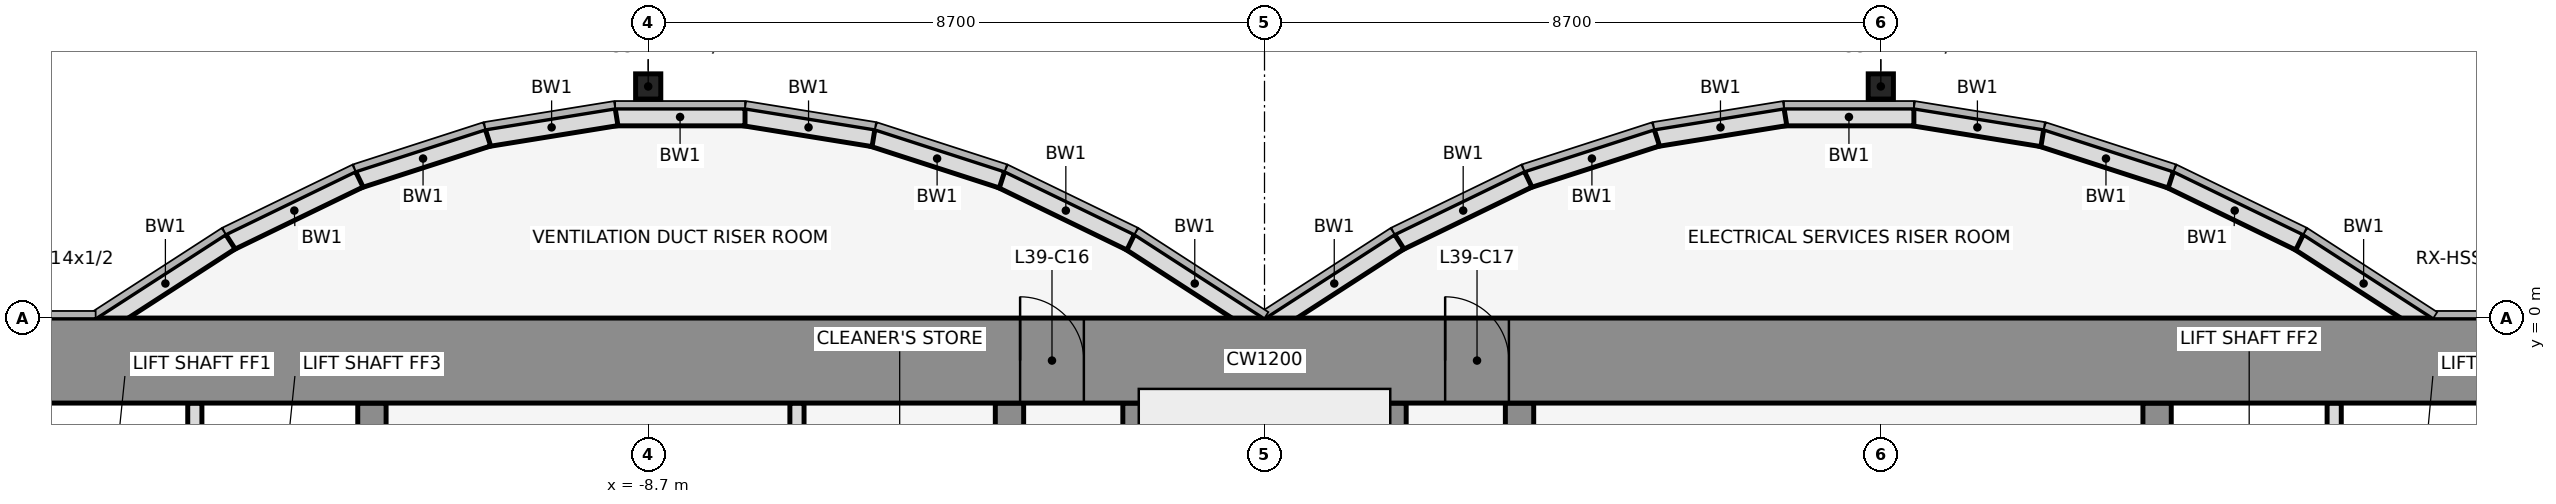
"""IFC4 building model, lengths in metres.
Left out: names, types, materials, properties, quantities, classifications, styles, units other than length and angle.
Written with IfcOpenShell. Run it as: python <this file> out.ifc"""

import sys

from ifc_helpers import new_model, si_unit, direction, frame, frame_2d, origin, origin_2d, place, context, subcontext, project, spatial, rectangle, hollow_rectangle, extrude, element, fill, save


model = new_model("IFC4")
c1 = context("Model", 3, precision=1e-05, world=origin(), true_north=direction((0.0, 1.0)))
c2 = subcontext(c1, "Body", "Model", "MODEL_VIEW")
j1 = project(units=[si_unit("LENGTHUNIT", "METRE"), si_unit("PLANEANGLEUNIT", "RADIAN")], contexts=[c1])
p1 = place(None, origin())
s1 = spatial("IfcSite", under=j1, at=p1, CompositionType="ELEMENT")
p2 = place(p1, origin())
s2 = spatial("IfcBuilding", under=s1, at=p2, CompositionType="ELEMENT")
p3 = place(p2, frame((0.0, 0.0, 177.3)))
s3 = spatial("IfcBuildingStorey", under=s2, at=p3, CompositionType="ELEMENT", Elevation=177.3)
for number, where, z_axis, x_axis in (
    (1, (-8.7, 3.269, 0.0), (0.0, 0.0, 1.0), (1.0, 0.0, 0.0)),
    (2, (8.7, 3.269, 0.0), (0.0, 0.0, 1.0), (1.0, 0.0, 0.0)),
):
    element("IfcColumn", number, at=place(p3, frame(where, z_axis=z_axis, x_axis=x_axis)), inside=s3, PredefinedType="COLUMN", context=c2, shape_type="SweptSolid", body=[
        extrude(hollow_rectangle(XDim=0.356, YDim=0.356, WallThickness=0.012, at=origin_2d()), origin(), (0.0, 0.0, 1.0), 4.1),
    ])
p4 = place(p3, frame((16.432, -0.105, 0.0), z_axis=(0.0, 0.0, 1.0), x_axis=(-0.83981312244, 0.542875602121, 0.0)))
e3 = element("IfcWall", 3, at=p4, inside=s3, PredefinedType="STANDARD", context=c2, shape_type="SweptSolid", body=[
    extrude(rectangle(XDim=2.183, YDim=0.25, at=frame_2d((1.091, 0.0))), origin(), (0.0, 0.0, 1.0), 3.95),
])
p5 = place(p3, frame((14.612, 1.073, 0.0), z_axis=(0.0, 0.0, 1.0), x_axis=(-0.89982408427, 0.436252928206, 0.0)))
e4 = element("IfcWall", 4, at=p5, inside=s3, PredefinedType="STANDARD", context=c2, shape_type="SweptSolid", body=[
    extrude(rectangle(XDim=2.038, YDim=0.25, at=frame_2d((1.019, 0.0))), origin(), (0.0, 0.0, 1.0), 3.95),
])
p6 = place(p3, frame((12.795, 1.955, 0.0), z_axis=(0.0, 0.0, 1.0), x_axis=(-0.951495806175, 0.307661714928, 0.0)))
e5 = element("IfcWall", 5, at=p6, inside=s3, PredefinedType="STANDARD", context=c2, shape_type="SweptSolid", body=[
    extrude(rectangle(XDim=1.927, YDim=0.25, at=frame_2d((0.963, 0.0))), origin(), (0.0, 0.0, 1.0), 3.95),
])
p7 = place(p3, frame((10.98, 2.543, 0.0), z_axis=(0.0, 0.0, 1.0), x_axis=(-0.987181718931, 0.159600293885, 0.0)))
e6 = element("IfcWall", 6, at=p7, inside=s3, PredefinedType="STANDARD", context=c2, shape_type="SweptSolid", body=[
    extrude(rectangle(XDim=1.857, YDim=0.25, at=frame_2d((0.929, 0.0))), origin(), (0.0, 0.0, 1.0), 3.95),
])
p8 = place(p3, frame((9.167, 2.838, 0.0), z_axis=(0.0, 0.0, 1.0), x_axis=(-1.0, 0.0, 0.0)))
e7 = element("IfcWall", 7, at=p8, inside=s3, PredefinedType="STANDARD", context=c2, shape_type="SweptSolid", body=[
    extrude(rectangle(XDim=1.833, YDim=0.25, at=frame_2d((0.917, 0.0))), origin(), (0.0, 0.0, 1.0), 3.95),
])
p9 = place(p3, frame((7.353, 2.84, 0.0), z_axis=(0.0, 0.0, 1.0), x_axis=(-0.987181718931, -0.159600293885, 0.0)))
e8 = element("IfcWall", 8, at=p9, inside=s3, PredefinedType="STANDARD", context=c2, shape_type="SweptSolid", body=[
    extrude(rectangle(XDim=1.857, YDim=0.25, at=frame_2d((0.929, 0.0))), origin(), (0.0, 0.0, 1.0), 3.95),
])
p10 = place(p3, frame((5.538, 2.548, 0.0), z_axis=(0.0, 0.0, 1.0), x_axis=(-0.951495806175, -0.307661714928, 0.0)))
e9 = element("IfcWall", 9, at=p10, inside=s3, PredefinedType="STANDARD", context=c2, shape_type="SweptSolid", body=[
    extrude(rectangle(XDim=1.927, YDim=0.25, at=frame_2d((0.963, 0.0))), origin(), (0.0, 0.0, 1.0), 3.95),
])
p11 = place(p3, frame((3.721, 1.962, 0.0), z_axis=(0.0, 0.0, 1.0), x_axis=(-0.89982408427, -0.436252928206, 0.0)))
e10 = element("IfcWall", 10, at=p11, inside=s3, PredefinedType="STANDARD", context=c2, shape_type="SweptSolid", body=[
    extrude(rectangle(XDim=2.038, YDim=0.25, at=frame_2d((1.019, 0.0))), origin(), (0.0, 0.0, 1.0), 3.95),
])
for number, where, z_axis, x_axis in (
    (11, (1.901, 1.08, 0.0), (0.0, 0.0, 1.0), (-0.84, -0.543, 0.0)),
    (12, (-0.068, -0.105, 0.0), (0.0, 0.0, 1.0), (-0.84, 0.543, 0.0)),
):
    element("IfcWall", number, at=place(p3, frame(where, z_axis=z_axis, x_axis=x_axis)), inside=s3, PredefinedType="STANDARD", context=c2, shape_type="SweptSolid", body=[
        extrude(rectangle(XDim=2.183, YDim=0.25, at=frame_2d((1.091, 0.0))), origin(), (0.0, 0.0, 1.0), 3.95),
    ])
p12 = place(p3, frame((-1.888, 1.073, 0.0), z_axis=(0.0, 0.0, 1.0), x_axis=(-0.89982408427, 0.436252928206, 0.0)))
e13 = element("IfcWall", 13, at=p12, inside=s3, PredefinedType="STANDARD", context=c2, shape_type="SweptSolid", body=[
    extrude(rectangle(XDim=2.038, YDim=0.25, at=frame_2d((1.019, 0.0))), origin(), (0.0, 0.0, 1.0), 3.95),
])
p13 = place(p3, frame((-3.705, 1.955, 0.0), z_axis=(0.0, 0.0, 1.0), x_axis=(-0.951495806175, 0.307661714928, 0.0)))
e14 = element("IfcWall", 14, at=p13, inside=s3, PredefinedType="STANDARD", context=c2, shape_type="SweptSolid", body=[
    extrude(rectangle(XDim=1.927, YDim=0.25, at=frame_2d((0.963, 0.0))), origin(), (0.0, 0.0, 1.0), 3.95),
])
p14 = place(p3, frame((-5.52, 2.543, 0.0), z_axis=(0.0, 0.0, 1.0), x_axis=(-0.987181718931, 0.159600293885, 0.0)))
e15 = element("IfcWall", 15, at=p14, inside=s3, PredefinedType="STANDARD", context=c2, shape_type="SweptSolid", body=[
    extrude(rectangle(XDim=1.857, YDim=0.25, at=frame_2d((0.929, 0.0))), origin(), (0.0, 0.0, 1.0), 3.95),
])
p15 = place(p3, frame((-7.333, 2.838, 0.0), z_axis=(0.0, 0.0, 1.0), x_axis=(-1.0, 0.0, 0.0)))
e16 = element("IfcWall", 16, at=p15, inside=s3, PredefinedType="STANDARD", context=c2, shape_type="SweptSolid", body=[
    extrude(rectangle(XDim=1.833, YDim=0.25, at=frame_2d((0.917, 0.0))), origin(), (0.0, 0.0, 1.0), 3.95),
])
p16 = place(p3, frame((-9.147, 2.84, 0.0), z_axis=(0.0, 0.0, 1.0), x_axis=(-0.987181718931, -0.159600293885, 0.0)))
e17 = element("IfcWall", 17, at=p16, inside=s3, PredefinedType="STANDARD", context=c2, shape_type="SweptSolid", body=[
    extrude(rectangle(XDim=1.857, YDim=0.25, at=frame_2d((0.929, 0.0))), origin(), (0.0, 0.0, 1.0), 3.95),
])
p17 = place(p3, frame((-10.962, 2.548, 0.0), z_axis=(0.0, 0.0, 1.0), x_axis=(-0.951495806175, -0.307661714928, 0.0)))
e18 = element("IfcWall", 18, at=p17, inside=s3, PredefinedType="STANDARD", context=c2, shape_type="SweptSolid", body=[
    extrude(rectangle(XDim=1.927, YDim=0.25, at=frame_2d((0.963, 0.0))), origin(), (0.0, 0.0, 1.0), 3.95),
])
p18 = place(p3, frame((-12.779, 1.962, 0.0), z_axis=(0.0, 0.0, 1.0), x_axis=(-0.89982408427, -0.436252928206, 0.0)))
e19 = element("IfcWall", 19, at=p18, inside=s3, PredefinedType="STANDARD", context=c2, shape_type="SweptSolid", body=[
    extrude(rectangle(XDim=2.038, YDim=0.25, at=frame_2d((1.019, 0.0))), origin(), (0.0, 0.0, 1.0), 3.95),
])
p19 = place(p3, frame((-14.599, 1.08, 0.0), z_axis=(0.0, 0.0, 1.0), x_axis=(-0.83981312244, -0.542875602121, 0.0)))
e20 = element("IfcWall", 20, at=p19, inside=s3, PredefinedType="STANDARD", context=c2, shape_type="SweptSolid", body=[
    extrude(rectangle(XDim=2.183, YDim=0.25, at=frame_2d((1.091, 0.0))), origin(), (0.0, 0.0, 1.0), 3.95),
])
p20 = place(p3, frame((-15.1, -4.6, 0.0), z_axis=(0.0, 0.0, 1.0), x_axis=(0.0, 1.0, 0.0)))
e21 = element("IfcWall", 21, at=p20, inside=s3, PredefinedType="PARTITIONING", context=c2, shape_type="SweptSolid", body=[
    extrude(rectangle(XDim=3.4, YDim=0.2, at=frame_2d((1.7, 0.0))), origin(), (0.0, 0.0, 1.0), 2.84),
])
p21 = place(p3, frame((-12.6, -11.8, 0.0), z_axis=(0.0, 0.0, 1.0), x_axis=(0.0, 1.0, 0.0)))
e22 = element("IfcWall", 22, at=p21, inside=s3, PredefinedType="SHEAR", context=c2, shape_type="SweptSolid", body=[
    extrude(rectangle(XDim=10.6, YDim=0.4, at=frame_2d((5.3, 0.0))), origin(), (0.0, 0.0, 1.0), 4.1),
])
p22 = place(p21, frame((4.75, 0.0, 0.0)))
e23 = element("IfcOpeningElement", 23, at=p22, cuts=e22, PredefinedType="OPENING", context=c2, shape_type="SweptSolid", body=[
    extrude(rectangle(XDim=1.1, YDim=2.1, at=frame_2d((0.55, 1.05))), frame((0.0, 0.212, 0.0), z_axis=(0.0, -1.0, 0.0), x_axis=(1.0, 0.0, 0.0)), (0.0, 0.0, 1.0), 0.424),
])
p23 = place(p3, frame((-6.6, -4.6, 0.0), z_axis=(0.0, 0.0, 1.0), x_axis=(0.0, 1.0, 0.0)))
e24 = element("IfcWall", 24, at=p23, inside=s3, PredefinedType="PARTITIONING", context=c2, shape_type="SweptSolid", body=[
    extrude(rectangle(XDim=3.4, YDim=0.2, at=frame_2d((1.7, 0.0))), origin(), (0.0, 0.0, 1.0), 2.84),
])
p24 = place(p3, frame((-3.6, -11.8, 0.0), z_axis=(0.0, 0.0, 1.0), x_axis=(0.0, 1.0, 0.0)))
e25 = element("IfcWall", 25, at=p24, inside=s3, PredefinedType="SHEAR", context=c2, shape_type="SweptSolid", body=[
    extrude(rectangle(XDim=10.6, YDim=0.4, at=frame_2d((5.3, 0.0))), origin(), (0.0, 0.0, 1.0), 4.1),
])
p25 = place(p24, frame((4.85, 0.0, 0.0)))
e26 = element("IfcOpeningElement", 26, at=p25, cuts=e25, PredefinedType="OPENING", context=c2, shape_type="SweptSolid", body=[
    extrude(rectangle(XDim=0.9, YDim=2.1, at=frame_2d((0.45, 1.05))), frame((0.0, 0.212, 0.0), z_axis=(0.0, -1.0, 0.0), x_axis=(1.0, 0.0, 0.0)), (0.0, 0.0, 1.0), 0.424),
])
for number, where, z_axis, x_axis in (
    (27, (-1.8, -11.8, 0.0), (0.0, 0.0, 1.0), (0.0, 1.0, 0.0)),
    (28, (1.8, -11.8, 0.0), (0.0, 0.0, 1.0), (0.0, 1.0, 0.0)),
):
    element("IfcWall", number, at=place(p3, frame(where, z_axis=z_axis, x_axis=x_axis)), inside=s3, PredefinedType="SHEAR", context=c2, shape_type="SweptSolid", body=[
        extrude(rectangle(XDim=10.6, YDim=0.4, at=frame_2d((5.3, 0.0))), origin(), (0.0, 0.0, 1.0), 4.1),
    ])
p26 = place(p3, frame((3.6, -11.8, 0.0), z_axis=(0.0, 0.0, 1.0), x_axis=(0.0, 1.0, 0.0)))
e29 = element("IfcWall", 29, at=p26, inside=s3, PredefinedType="SHEAR", context=c2, shape_type="SweptSolid", body=[
    extrude(rectangle(XDim=10.6, YDim=0.4, at=frame_2d((5.3, 0.0))), origin(), (0.0, 0.0, 1.0), 4.1),
])
p27 = place(p26, frame((1.35, 0.0, 0.0)))
e30 = element("IfcOpeningElement", 30, at=p27, cuts=e29, PredefinedType="OPENING", context=c2, shape_type="SweptSolid", body=[
    extrude(rectangle(XDim=0.9, YDim=2.1, at=frame_2d((0.45, 1.05))), frame((0.0, 0.212, 0.0), z_axis=(0.0, -1.0, 0.0), x_axis=(1.0, 0.0, 0.0)), (0.0, 0.0, 1.0), 0.424),
])
p28 = place(p3, frame((12.6, -11.8, 0.0), z_axis=(0.0, 0.0, 1.0), x_axis=(0.0, 1.0, 0.0)))
e31 = element("IfcWall", 31, at=p28, inside=s3, PredefinedType="SHEAR", context=c2, shape_type="SweptSolid", body=[
    extrude(rectangle(XDim=10.6, YDim=0.4, at=frame_2d((5.3, 0.0))), origin(), (0.0, 0.0, 1.0), 4.1),
])
p29 = place(p28, frame((1.25, 0.0, 0.0)))
e32 = element("IfcOpeningElement", 32, at=p29, cuts=e31, PredefinedType="OPENING", context=c2, shape_type="SweptSolid", body=[
    extrude(rectangle(XDim=1.2, YDim=2.1, at=frame_2d((0.6, 1.05))), frame((0.0, 0.212, 0.0), z_axis=(0.0, -1.0, 0.0), x_axis=(1.0, 0.0, 0.0)), (0.0, 0.0, 1.0), 0.424),
])
p30 = place(p28, frame((4.75, 0.0, 0.0)))
e33 = element("IfcOpeningElement", 33, at=p30, cuts=e31, PredefinedType="OPENING", context=c2, shape_type="SweptSolid", body=[
    extrude(rectangle(XDim=1.1, YDim=2.1, at=frame_2d((0.55, 1.05))), frame((0.0, 0.212, 0.0), z_axis=(0.0, -1.0, 0.0), x_axis=(1.0, 0.0, 0.0)), (0.0, 0.0, 1.0), 0.424),
])
p31 = place(p3, frame((15.1, -4.6, 0.0), z_axis=(0.0, 0.0, 1.0), x_axis=(0.0, 1.0, 0.0)))
e34 = element("IfcWall", 34, at=p31, inside=s3, PredefinedType="PARTITIONING", context=c2, shape_type="SweptSolid", body=[
    extrude(rectangle(XDim=3.4, YDim=0.2, at=frame_2d((1.7, 0.0))), origin(), (0.0, 0.0, 1.0), 2.84),
])
p32 = place(p3, frame((-22.0, -0.6, 0.0), z_axis=(0.0, 0.0, 1.0), x_axis=(1.0, 0.0, 0.0)))
e35 = element("IfcWall", 35, at=p32, inside=s3, PredefinedType="SHEAR", context=c2, shape_type="SweptSolid", body=[
    extrude(rectangle(XDim=44.0, YDim=1.2, at=frame_2d((22.0, 0.0))), origin(), (0.0, 0.0, 1.0), 4.1),
])
p33 = place(p32, frame((18.55, 0.0, 0.0)))
e36 = element("IfcOpeningElement", 36, at=p33, cuts=e35, PredefinedType="OPENING", context=c2, shape_type="SweptSolid", body=[
    extrude(rectangle(XDim=0.9, YDim=2.1, at=frame_2d((0.45, 1.05))), frame((0.0, 0.612, 0.0), z_axis=(0.0, -1.0, 0.0), x_axis=(1.0, 0.0, 0.0)), (0.0, 0.0, 1.0), 1.224),
])
p34 = place(p32, frame((24.55, 0.0, 0.0)))
e37 = element("IfcOpeningElement", 37, at=p34, cuts=e35, PredefinedType="OPENING", context=c2, shape_type="SweptSolid", body=[
    extrude(rectangle(XDim=0.9, YDim=2.1, at=frame_2d((0.45, 1.05))), frame((0.0, 0.612, 0.0), z_axis=(0.0, -1.0, 0.0), x_axis=(1.0, 0.0, 0.0)), (0.0, 0.0, 1.0), 1.224),
])
p35 = place(p33, origin())
e38 = element("IfcDoor", 38, at=p35, inside=s3, OperationType="SINGLE_SWING_LEFT", PredefinedType="DOOR", context=c2, shape_type="SweptSolid", body=[
    extrude(rectangle(XDim=0.9, YDim=2.1, at=frame_2d((0.45, 1.05))), frame((0.0, 0.025, 0.0), z_axis=(0.0, -1.0, 0.0), x_axis=(1.0, 0.0, 0.0)), (0.0, 0.0, 1.0), 0.05),
])
fill(e36, e38)
p36 = place(p34, origin())
e39 = element("IfcDoor", 39, at=p36, inside=s3, OperationType="SINGLE_SWING_LEFT", PredefinedType="DOOR", context=c2, shape_type="SweptSolid", body=[
    extrude(rectangle(XDim=0.9, YDim=2.1, at=frame_2d((0.45, 1.05))), frame((0.0, 0.025, 0.0), z_axis=(0.0, -1.0, 0.0), x_axis=(1.0, 0.0, 0.0)), (0.0, 0.0, 1.0), 0.05),
])
fill(e37, e39)
save(model, sys.argv[1])
